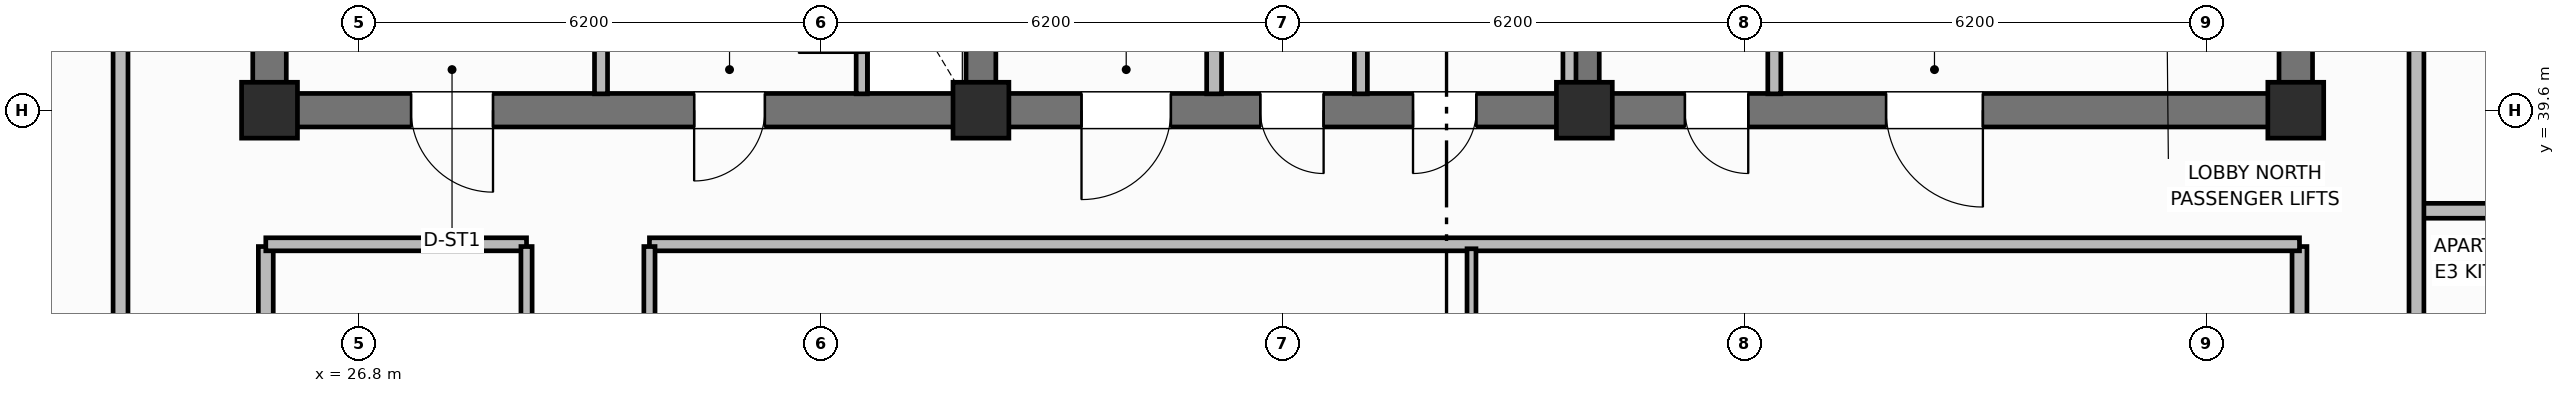
"""IFC4 building model, lengths in metres.
Left out: names, types, materials, properties, quantities, classifications, styles, units other than length and angle.
Written with IfcOpenShell. Run it as: python <this file> out.ifc"""

import sys

from ifc_helpers import new_model, si_unit, direction, frame, frame_2d, origin, origin_2d, place, context, subcontext, project, spatial, rectangle, extrude, element, fill, save


model = new_model("IFC4")
c1 = context("Model", 3, precision=1e-05, world=origin(), true_north=direction((0.0, 1.0)))
c2 = subcontext(c1, "Body", "Model", "MODEL_VIEW")
j1 = project(units=[si_unit("LENGTHUNIT", "METRE"), si_unit("PLANEANGLEUNIT", "RADIAN")], contexts=[c1])
p1 = place(None, origin())
s1 = spatial("IfcSite", under=j1, at=p1, CompositionType="ELEMENT")
p2 = place(p1, origin())
s2 = spatial("IfcBuilding", under=s1, at=p2, CompositionType="ELEMENT")
p3 = place(p2, frame((0.0, 0.0, 275.0)))
s3 = spatial("IfcBuildingStorey", under=s2, at=p3, CompositionType="ELEMENT", Elevation=275.0)
for number, where, z_axis, x_axis in (
    (1, (25.6, 39.825, 0.0), (0.0, 0.0, 1.0), (0.0, 1.0, 0.0)),
    (2, (52.8, 39.825, 0.0), (0.0, 0.0, 1.0), (0.0, 1.0, 0.0)),
):
    element("IfcWall", number, at=place(p3, frame(where, z_axis=z_axis, x_axis=x_axis)), inside=s3, PredefinedType="SHEAR", context=c2, shape_type="SweptSolid", body=[
        extrude(rectangle(XDim=5.75, YDim=0.45, at=frame_2d((2.875, 0.0))), origin(), (0.0, 0.0, 1.0), 3.7),
    ])
p4 = place(p3, frame((52.8, 39.6, 0.0), z_axis=(0.0, 0.0, 1.0), x_axis=(-1.0, 0.0, 0.0)))
e3 = element("IfcWall", 3, at=p4, inside=s3, PredefinedType="SHEAR", context=c2, shape_type="SweptSolid", body=[
    extrude(rectangle(XDim=27.2, YDim=0.45, at=frame_2d((13.6, 0.0))), origin(), (0.0, 0.0, 1.0), 3.7),
])
p5 = place(p4, frame((24.2, 0.0, 0.0)))
e4 = element("IfcOpeningElement", 4, at=p5, cuts=e3, PredefinedType="OPENING", context=c2, shape_type="SweptSolid", body=[
    extrude(rectangle(XDim=1.1, YDim=2.15, at=frame_2d((0.55, 1.075))), frame((0.0, 0.235, 0.0), z_axis=(0.0, -1.0, 0.0), x_axis=(1.0, 0.0, 0.0)), (0.0, 0.0, 1.0), 0.47),
])
p6 = place(p4, frame((20.55, 0.0, 0.0)))
e5 = element("IfcOpeningElement", 5, at=p6, cuts=e3, PredefinedType="OPENING", context=c2, shape_type="SweptSolid", body=[
    extrude(rectangle(XDim=0.95, YDim=2.1, at=frame_2d((0.475, 1.05))), frame((0.0, 0.235, 0.0), z_axis=(0.0, -1.0, 0.0), x_axis=(1.0, 0.0, 0.0)), (0.0, 0.0, 1.0), 0.47),
])
p7 = place(p4, frame((15.1, 0.0, 0.0)))
e6 = element("IfcOpeningElement", 6, at=p7, cuts=e3, PredefinedType="OPENING", context=c2, shape_type="SweptSolid", body=[
    extrude(rectangle(XDim=1.2, YDim=2.15, at=frame_2d((0.6, 1.075))), frame((0.0, 0.235, 0.0), z_axis=(0.0, -1.0, 0.0), x_axis=(1.0, 0.0, 0.0)), (0.0, 0.0, 1.0), 0.47),
])
p8 = place(p4, frame((13.05, 0.0, 0.0)))
e7 = element("IfcOpeningElement", 7, at=p8, cuts=e3, PredefinedType="OPENING", context=c2, shape_type="SweptSolid", body=[
    extrude(rectangle(XDim=0.85, YDim=2.1, at=frame_2d((0.425, 1.05))), frame((0.0, 0.235, 0.0), z_axis=(0.0, -1.0, 0.0), x_axis=(1.0, 0.0, 0.0)), (0.0, 0.0, 1.0), 0.47),
])
p9 = place(p4, frame((11.0, 0.0, 0.0)))
e8 = element("IfcOpeningElement", 8, at=p9, cuts=e3, PredefinedType="OPENING", context=c2, shape_type="SweptSolid", body=[
    extrude(rectangle(XDim=0.85, YDim=2.1, at=frame_2d((0.425, 1.05))), frame((0.0, 0.235, 0.0), z_axis=(0.0, -1.0, 0.0), x_axis=(1.0, 0.0, 0.0)), (0.0, 0.0, 1.0), 0.47),
])
p10 = place(p4, frame((7.35, 0.0, 0.0)))
e9 = element("IfcOpeningElement", 9, at=p10, cuts=e3, PredefinedType="OPENING", context=c2, shape_type="SweptSolid", body=[
    extrude(rectangle(XDim=0.85, YDim=2.1, at=frame_2d((0.425, 1.05))), frame((0.0, 0.235, 0.0), z_axis=(0.0, -1.0, 0.0), x_axis=(1.0, 0.0, 0.0)), (0.0, 0.0, 1.0), 0.47),
])
p11 = place(p4, frame((4.2, 0.0, 0.0)))
e10 = element("IfcOpeningElement", 10, at=p11, cuts=e3, PredefinedType="OPENING", context=c2, shape_type="SweptSolid", body=[
    extrude(rectangle(XDim=1.3, YDim=2.2, at=frame_2d((0.65, 1.1))), frame((0.0, 0.235, 0.0), z_axis=(0.0, -1.0, 0.0), x_axis=(1.0, 0.0, 0.0)), (0.0, 0.0, 1.0), 0.47),
])
for number, where, z_axis, x_axis in (
    (11, (35.15, 39.825, 0.0), (0.0, 0.0, 1.0), (0.0, 1.0, 0.0)),
    (12, (43.25, 39.825, 0.0), (0.0, 0.0, 1.0), (0.0, 1.0, 0.0)),
):
    element("IfcWall", number, at=place(p3, frame(where, z_axis=z_axis, x_axis=x_axis)), inside=s3, PredefinedType="SHEAR", context=c2, shape_type="SweptSolid", body=[
        extrude(rectangle(XDim=5.75, YDim=0.4, at=frame_2d((2.875, 0.0))), origin(), (0.0, 0.0, 1.0), 3.7),
    ])
for number, where, z_axis, x_axis in (
    (13, (25.6, 39.6, 0.0), (0.0, 0.0, 1.0), (1.0, 0.0, 0.0)),
    (14, (35.15, 39.6, 0.0), (0.0, 0.0, 1.0), (1.0, 0.0, 0.0)),
    (15, (43.25, 39.6, 0.0), (0.0, 0.0, 1.0), (1.0, 0.0, 0.0)),
    (16, (52.8, 39.6, 0.0), (0.0, 0.0, 1.0), (1.0, 0.0, 0.0)),
):
    element("IfcColumn", number, at=place(p3, frame(where, z_axis=z_axis, x_axis=x_axis)), inside=s3, PredefinedType="COLUMN", context=c2, shape_type="SweptSolid", body=[
        extrude(rectangle(XDim=0.75, YDim=0.75, at=origin_2d()), origin(), (0.0, 0.0, 1.0), 3.7),
    ])
p12 = place(p3, frame((33.55, 39.82, 0.0), z_axis=(0.0, 0.0, 1.0), x_axis=(0.0, 1.0, 0.0)))
e17 = element("IfcWall", 17, at=p12, inside=s3, PredefinedType="PARTITIONING", context=c2, shape_type="SweptSolid", body=[
    extrude(rectangle(XDim=2.13, YDim=0.15, at=frame_2d((1.065, 0.0))), origin(), (0.0, 0.0, 1.0), 2.56),
])
p13 = place(p12, frame((0.55, 0.0, 0.0)))
e18 = element("IfcOpeningElement", 18, at=p13, cuts=e17, PredefinedType="OPENING", context=c2, shape_type="SweptSolid", body=[
    extrude(rectangle(XDim=0.85, YDim=2.05, at=frame_2d((0.425, 1.025))), frame((0.0, 0.085, 0.0), z_axis=(0.0, -1.0, 0.0), x_axis=(1.0, 0.0, 0.0)), (0.0, 0.0, 1.0), 0.17),
])
p14 = place(p3, frame((30.05, 39.82, 0.0), z_axis=(0.0, 0.0, 1.0), x_axis=(0.0, 1.0, 0.0)))
e19 = element("IfcWall", 19, at=p14, inside=s3, PredefinedType="PARTITIONING", context=c2, shape_type="SweptSolid", body=[
    extrude(rectangle(XDim=2.13, YDim=0.175, at=frame_2d((1.065, 0.0))), origin(), (0.0, 0.0, 1.0), 2.56),
])
p15 = place(p3, frame((38.28, 39.82, 0.0), z_axis=(0.0, 0.0, 1.0), x_axis=(0.0, 1.0, 0.0)))
e20 = element("IfcWall", 20, at=p15, inside=s3, PredefinedType="PARTITIONING", context=c2, shape_type="SweptSolid", body=[
    extrude(rectangle(XDim=5.63, YDim=0.2, at=frame_2d((2.815, 0.0))), origin(), (0.0, 0.0, 1.0), 2.56),
])
for number, where, z_axis, x_axis in (
    (21, (43.05, 39.82, 0.0), (0.0, 0.0, 1.0), (0.0, 1.0, 0.0)),
    (22, (40.25, 39.82, 0.0), (0.0, 0.0, 1.0), (0.0, 1.0, 0.0)),
    (23, (45.8, 39.82, 0.0), (0.0, 0.0, 1.0), (0.0, 1.0, 0.0)),
):
    element("IfcWall", number, at=place(p3, frame(where, z_axis=z_axis, x_axis=x_axis)), inside=s3, PredefinedType="PARTITIONING", context=c2, shape_type="SweptSolid", body=[
        extrude(rectangle(XDim=5.63, YDim=0.175, at=frame_2d((2.815, 0.0))), origin(), (0.0, 0.0, 1.0), 2.56),
    ])
for number, where, z_axis, x_axis in (
    (24, (25.55, 18.63, 0.0), (0.0, 0.0, 1.0), (0.0, 1.0, 0.0)),
    (25, (52.85, 18.63, 0.0), (0.0, 0.0, 1.0), (0.0, 1.0, 0.0)),
):
    element("IfcWall", number, at=place(p3, frame(where, z_axis=z_axis, x_axis=x_axis)), inside=s3, PredefinedType="PARTITIONING", context=c2, shape_type="SweptSolid", body=[
        extrude(rectangle(XDim=19.14, YDim=0.2, at=frame_2d((9.57, 0.0))), origin(), (0.0, 0.0, 1.0), 2.56),
    ])
p16 = place(p3, frame((25.55, 37.8, 0.0), z_axis=(0.0, 0.0, 1.0), x_axis=(1.0, 0.0, 0.0)))
e26 = element("IfcWall", 26, at=p16, inside=s3, PredefinedType="PARTITIONING", context=c2, shape_type="SweptSolid", body=[
    extrude(rectangle(XDim=3.5, YDim=0.175, at=frame_2d((1.75, 0.0))), origin(), (0.0, 0.0, 1.0), 2.56),
])
p17 = place(p3, frame((30.7, 37.8, 0.0), z_axis=(0.0, 0.0, 1.0), x_axis=(1.0, 0.0, 0.0)))
e27 = element("IfcWall", 27, at=p17, inside=s3, PredefinedType="PARTITIONING", context=c2, shape_type="SweptSolid", body=[
    extrude(rectangle(XDim=22.15, YDim=0.175, at=frame_2d((11.075, 0.0))), origin(), (0.0, 0.0, 1.0), 2.56),
])
p18 = place(p3, frame((41.735, 29.388, 0.0), z_axis=(0.0, 0.0, 1.0), x_axis=(0.0, 1.0, 0.0)))
e28 = element("IfcWall", 28, at=p18, inside=s3, PredefinedType="PARTITIONING", context=c2, shape_type="SweptSolid", body=[
    extrude(rectangle(XDim=8.352, YDim=0.12, at=frame_2d((4.176, 0.0))), origin(), (0.0, 0.0, 1.0), 2.56),
])
p19 = place(p18, frame((2.0, 0.0, 0.0)))
e29 = element("IfcOpeningElement", 29, at=p19, cuts=e28, PredefinedType="OPENING", context=c2, shape_type="SweptSolid", body=[
    extrude(rectangle(XDim=0.9, YDim=2.1, at=frame_2d((0.45, 1.05))), frame((0.0, 0.07, 0.0), z_axis=(0.0, -1.0, 0.0), x_axis=(1.0, 0.0, 0.0)), (0.0, 0.0, 1.0), 0.14),
])
p20 = place(p3, frame((29.05, 18.63, 0.0), z_axis=(0.0, 0.0, 1.0), x_axis=(0.0, 1.0, 0.0)))
e30 = element("IfcWall", 30, at=p20, inside=s3, PredefinedType="PARTITIONING", context=c2, shape_type="SweptSolid", body=[
    extrude(rectangle(XDim=19.14, YDim=0.15, at=frame_2d((9.57, 0.0))), origin(), (0.0, 0.0, 1.0), 2.56),
])
p21 = place(p20, frame((5.5, 0.0, 0.0)))
e31 = element("IfcOpeningElement", 31, at=p21, cuts=e30, PredefinedType="OPENING", context=c2, shape_type="SweptSolid", body=[
    extrude(rectangle(XDim=1.0, YDim=2.15, at=frame_2d((0.5, 1.075))), frame((0.0, 0.085, 0.0), z_axis=(0.0, -1.0, 0.0), x_axis=(1.0, 0.0, 0.0)), (0.0, 0.0, 1.0), 0.17),
])
p22 = place(p3, frame((30.7, 18.63, 0.0), z_axis=(0.0, 0.0, 1.0), x_axis=(0.0, 1.0, 0.0)))
e32 = element("IfcWall", 32, at=p22, inside=s3, PredefinedType="PARTITIONING", context=c2, shape_type="SweptSolid", body=[
    extrude(rectangle(XDim=19.14, YDim=0.15, at=frame_2d((9.57, 0.0))), origin(), (0.0, 0.0, 1.0), 2.56),
])
p23 = place(p22, frame((2.2, 0.0, 0.0)))
e33 = element("IfcOpeningElement", 33, at=p23, cuts=e32, PredefinedType="OPENING", context=c2, shape_type="SweptSolid", body=[
    extrude(rectangle(XDim=1.0, YDim=2.15, at=frame_2d((0.5, 1.075))), frame((0.0, 0.085, 0.0), z_axis=(0.0, -1.0, 0.0), x_axis=(1.0, 0.0, 0.0)), (0.0, 0.0, 1.0), 0.17),
])
p24 = place(p22, frame((12.719, 0.0, 0.0)))
e34 = element("IfcOpeningElement", 34, at=p24, cuts=e32, PredefinedType="OPENING", context=c2, shape_type="SweptSolid", body=[
    extrude(rectangle(XDim=1.0, YDim=2.15, at=frame_2d((0.5, 1.075))), frame((0.0, 0.085, 0.0), z_axis=(0.0, -1.0, 0.0), x_axis=(1.0, 0.0, 0.0)), (0.0, 0.0, 1.0), 0.17),
])
p25 = place(p3, frame((23.6, 9.95, 0.0), z_axis=(0.0, 0.0, 1.0), x_axis=(0.0, 1.0, 0.0)))
e35 = element("IfcWall", 35, at=p25, inside=s3, PredefinedType="PARTITIONING", context=c2, shape_type="SweptSolid", body=[
    extrude(rectangle(XDim=36.5, YDim=0.2, at=frame_2d((18.25, 0.0))), origin(), (0.0, 0.0, 1.0), 2.56),
])
p26 = place(p25, frame((3.25, 0.0, 0.0)))
e36 = element("IfcOpeningElement", 36, at=p26, cuts=e35, PredefinedType="OPENING", context=c2, shape_type="SweptSolid", body=[
    extrude(rectangle(XDim=1.0, YDim=2.15, at=frame_2d((0.5, 1.075))), frame((0.0, 0.11, 0.0), z_axis=(0.0, -1.0, 0.0), x_axis=(1.0, 0.0, 0.0)), (0.0, 0.0, 1.0), 0.22),
])
p27 = place(p3, frame((54.42, 38.25, 0.0), z_axis=(0.0, 0.0, 1.0), x_axis=(1.0, 0.0, 0.0)))
e37 = element("IfcWall", 37, at=p27, inside=s3, PredefinedType="PARTITIONING", context=c2, shape_type="SweptSolid", body=[
    extrude(rectangle(XDim=4.45, YDim=0.2, at=frame_2d((2.225, 0.0))), origin(), (0.0, 0.0, 1.0), 2.56),
])
p28 = place(p3, frame((54.42, 9.95, 0.0), z_axis=(0.0, 0.0, 1.0), x_axis=(0.0, 1.0, 0.0)))
e38 = element("IfcWall", 38, at=p28, inside=s3, PredefinedType="PARTITIONING", context=c2, shape_type="SweptSolid", body=[
    extrude(rectangle(XDim=36.5, YDim=0.2, at=frame_2d((18.25, 0.0))), origin(), (0.0, 0.0, 1.0), 2.56),
])
p29 = place(p28, frame((3.11, 0.0, 0.0)))
e39 = element("IfcOpeningElement", 39, at=p29, cuts=e38, PredefinedType="OPENING", context=c2, shape_type="SweptSolid", body=[
    extrude(rectangle(XDim=1.0, YDim=2.15, at=frame_2d((0.5, 1.075))), frame((0.0, 0.11, 0.0), z_axis=(0.0, -1.0, 0.0), x_axis=(1.0, 0.0, 0.0)), (0.0, 0.0, 1.0), 0.22),
])
p30 = place(p28, frame((11.99, 0.0, 0.0)))
e40 = element("IfcOpeningElement", 40, at=p30, cuts=e38, PredefinedType="OPENING", context=c2, shape_type="SweptSolid", body=[
    extrude(rectangle(XDim=1.0, YDim=2.15, at=frame_2d((0.5, 1.075))), frame((0.0, 0.11, 0.0), z_axis=(0.0, -1.0, 0.0), x_axis=(1.0, 0.0, 0.0)), (0.0, 0.0, 1.0), 0.22),
])
p31 = place(p28, frame((23.5, 0.0, 0.0)))
e41 = element("IfcOpeningElement", 41, at=p31, cuts=e38, PredefinedType="OPENING", context=c2, shape_type="SweptSolid", body=[
    extrude(rectangle(XDim=1.0, YDim=2.15, at=frame_2d((0.5, 1.075))), frame((0.0, 0.11, 0.0), z_axis=(0.0, -1.0, 0.0), x_axis=(1.0, 0.0, 0.0)), (0.0, 0.0, 1.0), 0.22),
])
p32 = place(p28, frame((31.2, 0.0, 0.0)))
e42 = element("IfcOpeningElement", 42, at=p32, cuts=e38, PredefinedType="OPENING", context=c2, shape_type="SweptSolid", body=[
    extrude(rectangle(XDim=1.0, YDim=2.15, at=frame_2d((0.5, 1.075))), frame((0.0, 0.11, 0.0), z_axis=(0.0, -1.0, 0.0), x_axis=(1.0, 0.0, 0.0)), (0.0, 0.0, 1.0), 0.22),
])
p33 = place(p13, origin())
e43 = element("IfcDoor", 43, at=p33, inside=s3, OperationType="SINGLE_SWING_LEFT", PredefinedType="TRAPDOOR", context=c2, shape_type="SweptSolid", body=[
    extrude(rectangle(XDim=0.85, YDim=2.05, at=frame_2d((0.425, 1.025))), frame((0.0, 0.025, 0.0), z_axis=(0.0, -1.0, 0.0), x_axis=(1.0, 0.0, 0.0)), (0.0, 0.0, 1.0), 0.05),
])
fill(e18, e43)
p34 = place(p5, origin())
e44 = element("IfcDoor", 44, at=p34, inside=s3, OperationType="SINGLE_SWING_LEFT", PredefinedType="DOOR", context=c2, shape_type="SweptSolid", body=[
    extrude(rectangle(XDim=1.1, YDim=2.15, at=frame_2d((0.55, 1.075))), frame((0.0, 0.025, 0.0), z_axis=(0.0, -1.0, 0.0), x_axis=(1.0, 0.0, 0.0)), (0.0, 0.0, 1.0), 0.05),
])
fill(e4, e44)
p35 = place(p6, origin())
e45 = element("IfcDoor", 45, at=p35, inside=s3, OperationType="SINGLE_SWING_RIGHT", PredefinedType="DOOR", context=c2, shape_type="SweptSolid", body=[
    extrude(rectangle(XDim=0.95, YDim=2.1, at=frame_2d((0.475, 1.05))), frame((0.0, 0.025, 0.0), z_axis=(0.0, -1.0, 0.0), x_axis=(1.0, 0.0, 0.0)), (0.0, 0.0, 1.0), 0.05),
])
fill(e5, e45)
p36 = place(p7, origin())
e46 = element("IfcDoor", 46, at=p36, inside=s3, OperationType="SINGLE_SWING_RIGHT", PredefinedType="DOOR", context=c2, shape_type="SweptSolid", body=[
    extrude(rectangle(XDim=1.2, YDim=2.15, at=frame_2d((0.6, 1.075))), frame((0.0, 0.025, 0.0), z_axis=(0.0, -1.0, 0.0), x_axis=(1.0, 0.0, 0.0)), (0.0, 0.0, 1.0), 0.05),
])
fill(e6, e46)
p37 = place(p8, origin())
e47 = element("IfcDoor", 47, at=p37, inside=s3, OperationType="SINGLE_SWING_LEFT", PredefinedType="DOOR", context=c2, shape_type="SweptSolid", body=[
    extrude(rectangle(XDim=0.85, YDim=2.1, at=frame_2d((0.425, 1.05))), frame((0.0, 0.025, 0.0), z_axis=(0.0, -1.0, 0.0), x_axis=(1.0, 0.0, 0.0)), (0.0, 0.0, 1.0), 0.05),
])
fill(e7, e47)
p38 = place(p9, origin())
e48 = element("IfcDoor", 48, at=p38, inside=s3, OperationType="SINGLE_SWING_RIGHT", PredefinedType="DOOR", context=c2, shape_type="SweptSolid", body=[
    extrude(rectangle(XDim=0.85, YDim=2.1, at=frame_2d((0.425, 1.05))), frame((0.0, 0.025, 0.0), z_axis=(0.0, -1.0, 0.0), x_axis=(1.0, 0.0, 0.0)), (0.0, 0.0, 1.0), 0.05),
])
fill(e8, e48)
p39 = place(p10, origin())
e49 = element("IfcDoor", 49, at=p39, inside=s3, OperationType="SINGLE_SWING_LEFT", PredefinedType="DOOR", context=c2, shape_type="SweptSolid", body=[
    extrude(rectangle(XDim=0.85, YDim=2.1, at=frame_2d((0.425, 1.05))), frame((0.0, 0.025, 0.0), z_axis=(0.0, -1.0, 0.0), x_axis=(1.0, 0.0, 0.0)), (0.0, 0.0, 1.0), 0.05),
])
fill(e9, e49)
p40 = place(p11, origin())
e50 = element("IfcDoor", 50, at=p40, inside=s3, OperationType="SINGLE_SWING_LEFT", PredefinedType="DOOR", context=c2, shape_type="SweptSolid", body=[
    extrude(rectangle(XDim=1.3, YDim=2.2, at=frame_2d((0.65, 1.1))), frame((0.0, 0.025, 0.0), z_axis=(0.0, -1.0, 0.0), x_axis=(1.0, 0.0, 0.0)), (0.0, 0.0, 1.0), 0.05),
])
fill(e10, e50)
save(model, sys.argv[1])
